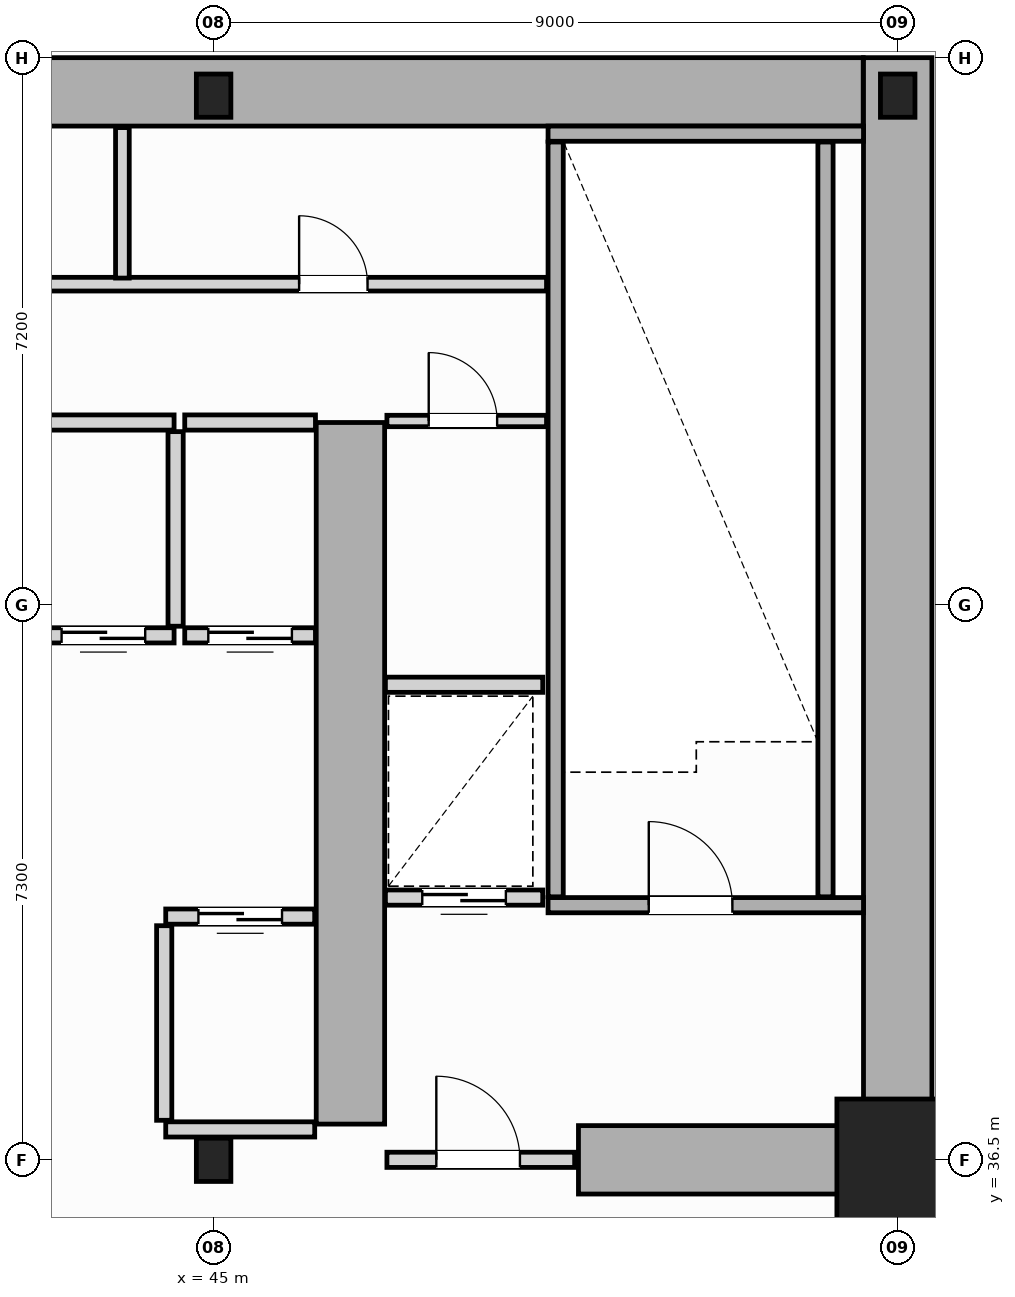
"""IFC4 building model, lengths in metres.
Left out: names, types, materials, properties, quantities, classifications, styles, units other than length and angle.
Written with IfcOpenShell. Run it as: python <this file> out.ifc"""

import sys

from ifc_helpers import new_model, si_unit, direction, frame, frame_2d, origin, origin_2d, place, context, subcontext, project, spatial, rectangle, i_section, extrude, source, transform, mapped, element, fill, save


model = new_model("IFC4")
c1 = context("Model", 3, precision=1e-05, world=origin(), true_north=direction((0.0, 1.0)))
c2 = subcontext(c1, "Body", "Model", "MODEL_VIEW")
j1 = project(units=[si_unit("LENGTHUNIT", "METRE"), si_unit("PLANEANGLEUNIT", "RADIAN")], contexts=[c1])
p1 = place(None, origin())
s1 = spatial("IfcSite", under=j1, at=p1, CompositionType="ELEMENT")
p2 = place(p1, origin())
s2 = spatial("IfcBuilding", under=s1, at=p2, CompositionType="ELEMENT")
p3 = place(p2, origin())
s3 = spatial("IfcBuildingStorey", under=s2, at=p3, CompositionType="ELEMENT", Elevation=0.0)
m1 = source(origin(), c2, "Body", "SweptSolid", [
    extrude(i_section(OverallWidth=0.454, OverallDepth=0.569, WebThickness=0.078, FlangeThickness=0.08, FilletRadius=0.015, at=origin_2d()), origin(), (0.0, 0.0, 1.0), 5.6),
])
p4 = place(p3, frame((45.0, 36.5, 0.0), z_axis=(0.0, 0.0, 1.0), x_axis=(1.0, 0.0, 0.0)))
e1 = element("IfcColumn", 1, at=p4, inside=s3, PredefinedType="COLUMN", context=c2, shape_type="MappedRepresentation", body=[
    mapped(m1, transform((0.0, 0.0, 0.0), scale=1.0)),
])
m2 = source(origin(), c2, "Body", "SweptSolid", [
    extrude(rectangle(XDim=1.6, YDim=1.6, at=origin_2d()), origin(), (0.0, 0.0, 1.0), 5.6),
])
p5 = place(p3, frame((54.0, 36.5, 0.0), z_axis=(0.0, 0.0, 1.0), x_axis=(1.0, 0.0, 0.0)))
e2 = element("IfcColumn", 2, at=p5, inside=s3, PredefinedType="COLUMN", context=c2, shape_type="MappedRepresentation", body=[
    mapped(m2, transform((0.0, 0.0, 0.0), scale=1.0)),
])
for number, where, z_axis, x_axis in (
    (3, (45.0, 50.5, 0.0), (0.0, 0.0, 1.0), (1.0, 0.0, 0.0)),
    (4, (54.0, 50.5, 0.0), (0.0, 0.0, 1.0), (1.0, 0.0, 0.0)),
):
    element("IfcColumn", number, at=place(p3, frame(where, z_axis=z_axis, x_axis=x_axis)), inside=s3, PredefinedType="COLUMN", context=c2, shape_type="MappedRepresentation", body=[
        mapped(m1, transform((0.0, 0.0, 0.0), scale=1.0)),
    ])
p6 = place(p3, frame((34.002, 50.55, 0.0), z_axis=(0.0, 0.0, 1.0), x_axis=(1.0, 0.0, 0.0)))
e5 = element("IfcWall", 5, at=p6, inside=s3, PredefinedType="SHEAR", context=c2, shape_type="SweptSolid", body=[
    extrude(rectangle(XDim=19.544, YDim=0.9, at=frame_2d((9.772, 0.0))), origin(), (0.0, 0.0, 1.0), 5.6),
])
p7 = place(p3, frame((54.0, 36.5, 0.0), z_axis=(0.0, 0.0, 1.0), x_axis=(0.0, 1.0, 0.0)))
e6 = element("IfcWall", 6, at=p7, inside=s3, PredefinedType="SHEAR", context=c2, shape_type="SweptSolid", body=[
    extrude(rectangle(XDim=14.5, YDim=0.9, at=frame_2d((7.25, 0.0))), origin(), (0.0, 0.0, 1.0), 5.6),
])
p8 = place(p3, frame((49.8, 36.5, 0.0), z_axis=(0.0, 0.0, 1.0), x_axis=(1.0, 0.0, 0.0)))
e7 = element("IfcWall", 7, at=p8, inside=s3, PredefinedType="SHEAR", context=c2, shape_type="SweptSolid", body=[
    extrude(rectangle(XDim=3.73, YDim=0.9, at=frame_2d((1.865, 0.0))), origin(), (0.0, 0.0, 1.0), 4.12),
])
p9 = place(p3, frame((46.8, 36.97, 0.0), z_axis=(0.0, 0.0, 1.0), x_axis=(0.0, 1.0, 0.0)))
e8 = element("IfcWall", 8, at=p9, inside=s3, PredefinedType="SHEAR", context=c2, shape_type="SweptSolid", body=[
    extrude(rectangle(XDim=9.23, YDim=0.9, at=frame_2d((4.615, 0.0))), origin(), (0.0, 0.0, 1.0), 5.6),
])
p10 = place(p3, frame((49.4, 39.85, 0.0), z_axis=(0.0, 0.0, 1.0), x_axis=(1.0, 0.0, 0.0)))
e9 = element("IfcWall", 9, at=p10, inside=s3, PredefinedType="SOLIDWALL", context=c2, shape_type="SweptSolid", body=[
    extrude(rectangle(XDim=4.15, YDim=0.2, at=frame_2d((2.075, 0.0))), origin(), (0.0, 0.0, 1.0), 5.6),
])
p11 = place(p10, frame((1.325, 0.0, 0.0)))
e10 = element("IfcOpeningElement", 10, at=p11, cuts=e9, PredefinedType="OPENING", context=c2, shape_type="SweptSolid", body=[
    extrude(rectangle(XDim=1.1, YDim=2.15, at=frame_2d((0.55, 1.075))), frame((0.0, 0.11, 0.0), z_axis=(0.0, -1.0, 0.0), x_axis=(1.0, 0.0, 0.0)), (0.0, 0.0, 1.0), 0.22),
])
p12 = place(p3, frame((49.4, 50.0, 0.0), z_axis=(0.0, 0.0, 1.0), x_axis=(1.0, 0.0, 0.0)))
e11 = element("IfcWall", 11, at=p12, inside=s3, PredefinedType="SOLIDWALL", context=c2, shape_type="SweptSolid", body=[
    extrude(rectangle(XDim=4.15, YDim=0.2, at=frame_2d((2.075, 0.0))), origin(), (0.0, 0.0, 1.0), 5.6),
])
for number, where, z_axis, x_axis in (
    (12, (49.5, 39.96, 0.0), (0.0, 0.0, 1.0), (0.0, 1.0, 0.0)),
    (13, (53.05, 39.96, 0.0), (0.0, 0.0, 1.0), (0.0, 1.0, 0.0)),
):
    element("IfcWall", number, at=place(p3, frame(where, z_axis=z_axis, x_axis=x_axis)), inside=s3, PredefinedType="SOLIDWALL", context=c2, shape_type="SweptSolid", body=[
        extrude(rectangle(XDim=9.93, YDim=0.2, at=frame_2d((4.965, 0.0))), origin(), (0.0, 0.0, 1.0), 5.6),
    ])
p13 = place(p3, frame((47.28, 36.5, 0.0), z_axis=(0.0, 0.0, 1.0), x_axis=(1.0, 0.0, 0.0)))
e14 = element("IfcWall", 14, at=p13, inside=s3, PredefinedType="SOLIDWALL", context=c2, shape_type="SweptSolid", body=[
    extrude(rectangle(XDim=2.47, YDim=0.2, at=frame_2d((1.235, 0.0))), origin(), (0.0, 0.0, 1.0), 4.11),
])
p14 = place(p13, frame((0.65, 0.0, 0.0)))
e15 = element("IfcOpeningElement", 15, at=p14, cuts=e14, PredefinedType="OPENING", context=c2, shape_type="SweptSolid", body=[
    extrude(rectangle(XDim=1.1, YDim=2.15, at=frame_2d((0.55, 1.075))), frame((0.0, 0.11, 0.0), z_axis=(0.0, -1.0, 0.0), x_axis=(1.0, 0.0, 0.0)), (0.0, 0.0, 1.0), 0.22),
])
p15 = place(p3, frame((44.37, 39.7, 0.0), z_axis=(0.0, 0.0, 1.0), x_axis=(1.0, 0.0, 0.0)))
e16 = element("IfcWall", 16, at=p15, inside=s3, PredefinedType="SOLIDWALL", context=c2, shape_type="SweptSolid", body=[
    extrude(rectangle(XDim=1.96, YDim=0.2, at=frame_2d((0.98, 0.0))), origin(), (0.0, 0.0, 1.0), 5.32),
])
p16 = place(p15, frame((0.43, 0.0, 0.0)))
e17 = element("IfcOpeningElement", 17, at=p16, cuts=e16, PredefinedType="OPENING", context=c2, shape_type="SweptSolid", body=[
    extrude(rectangle(XDim=1.1, YDim=2.15, at=frame_2d((0.55, 1.075))), frame((0.0, 0.11, 0.0), z_axis=(0.0, -1.0, 0.0), x_axis=(1.0, 0.0, 0.0)), (0.0, 0.0, 1.0), 0.22),
])
p17 = place(p3, frame((44.37, 36.9, 0.0), z_axis=(0.0, 0.0, 1.0), x_axis=(1.0, 0.0, 0.0)))
e18 = element("IfcWall", 18, at=p17, inside=s3, PredefinedType="SOLIDWALL", context=c2, shape_type="SweptSolid", body=[
    extrude(rectangle(XDim=1.96, YDim=0.2, at=frame_2d((0.98, 0.0))), origin(), (0.0, 0.0, 1.0), 4.11),
])
p18 = place(p3, frame((44.35, 37.02, 0.0), z_axis=(0.0, 0.0, 1.0), x_axis=(0.0, 1.0, 0.0)))
e19 = element("IfcWall", 19, at=p18, inside=s3, PredefinedType="SOLIDWALL", context=c2, shape_type="SweptSolid", body=[
    extrude(rectangle(XDim=2.56, YDim=0.2, at=frame_2d((1.28, 0.0))), origin(), (0.0, 0.0, 1.0), 5.32),
])
p19 = place(p3, frame((42.62, 43.4, 0.0), z_axis=(0.0, 0.0, 1.0), x_axis=(1.0, 0.0, 0.0)))
e20 = element("IfcWall", 20, at=p19, inside=s3, PredefinedType="SOLIDWALL", context=c2, shape_type="SweptSolid", body=[
    extrude(rectangle(XDim=1.86, YDim=0.2, at=frame_2d((0.93, 0.0))), origin(), (0.0, 0.0, 1.0), 5.32),
])
p20 = place(p19, frame((0.38, 0.0, 0.0)))
e21 = element("IfcOpeningElement", 21, at=p20, cuts=e20, PredefinedType="OPENING", context=c2, shape_type="SweptSolid", body=[
    extrude(rectangle(XDim=1.1, YDim=2.15, at=frame_2d((0.55, 1.075))), frame((0.0, 0.11, 0.0), z_axis=(0.0, -1.0, 0.0), x_axis=(1.0, 0.0, 0.0)), (0.0, 0.0, 1.0), 0.22),
])
p21 = place(p3, frame((42.62, 46.2, 0.0), z_axis=(0.0, 0.0, 1.0), x_axis=(1.0, 0.0, 0.0)))
e22 = element("IfcWall", 22, at=p21, inside=s3, PredefinedType="SOLIDWALL", context=c2, shape_type="SweptSolid", body=[
    extrude(rectangle(XDim=1.86, YDim=0.2, at=frame_2d((0.93, 0.0))), origin(), (0.0, 0.0, 1.0), 5.32),
])
p22 = place(p3, frame((44.5, 43.52, 0.0), z_axis=(0.0, 0.0, 1.0), x_axis=(0.0, 1.0, 0.0)))
e23 = element("IfcWall", 23, at=p22, inside=s3, PredefinedType="SOLIDWALL", context=c2, shape_type="SweptSolid", body=[
    extrude(rectangle(XDim=2.56, YDim=0.2, at=frame_2d((1.28, 0.0))), origin(), (0.0, 0.0, 1.0), 5.32),
])
p23 = place(p3, frame((44.62, 43.4, 0.0), z_axis=(0.0, 0.0, 1.0), x_axis=(1.0, 0.0, 0.0)))
e24 = element("IfcWall", 24, at=p23, inside=s3, PredefinedType="SOLIDWALL", context=c2, shape_type="SweptSolid", body=[
    extrude(rectangle(XDim=1.72, YDim=0.2, at=frame_2d((0.86, 0.0))), origin(), (0.0, 0.0, 1.0), 5.32),
])
p24 = place(p23, frame((0.31, 0.0, 0.0)))
e25 = element("IfcOpeningElement", 25, at=p24, cuts=e24, PredefinedType="OPENING", context=c2, shape_type="SweptSolid", body=[
    extrude(rectangle(XDim=1.1, YDim=2.15, at=frame_2d((0.55, 1.075))), frame((0.0, 0.11, 0.0), z_axis=(0.0, -1.0, 0.0), x_axis=(1.0, 0.0, 0.0)), (0.0, 0.0, 1.0), 0.22),
])
p25 = place(p3, frame((44.62, 46.2, 0.0), z_axis=(0.0, 0.0, 1.0), x_axis=(1.0, 0.0, 0.0)))
e26 = element("IfcWall", 26, at=p25, inside=s3, PredefinedType="SOLIDWALL", context=c2, shape_type="SweptSolid", body=[
    extrude(rectangle(XDim=1.72, YDim=0.2, at=frame_2d((0.86, 0.0))), origin(), (0.0, 0.0, 1.0), 5.32),
])
p26 = place(p3, frame((47.26, 39.95, 0.0), z_axis=(0.0, 0.0, 1.0), x_axis=(1.0, 0.0, 0.0)))
e27 = element("IfcWall", 27, at=p26, inside=s3, PredefinedType="SOLIDWALL", context=c2, shape_type="SweptSolid", body=[
    extrude(rectangle(XDim=2.07, YDim=0.2, at=frame_2d((1.035, 0.0))), origin(), (0.0, 0.0, 1.0), 5.32),
])
p27 = place(p26, frame((0.485, 0.0, 0.0)))
e28 = element("IfcOpeningElement", 28, at=p27, cuts=e27, PredefinedType="OPENING", context=c2, shape_type="SweptSolid", body=[
    extrude(rectangle(XDim=1.1, YDim=2.15, at=frame_2d((0.55, 1.075))), frame((0.0, 0.11, 0.0), z_axis=(0.0, -1.0, 0.0), x_axis=(1.0, 0.0, 0.0)), (0.0, 0.0, 1.0), 0.22),
])
p28 = place(p3, frame((47.26, 42.75, 0.0), z_axis=(0.0, 0.0, 1.0), x_axis=(1.0, 0.0, 0.0)))
e29 = element("IfcWall", 29, at=p28, inside=s3, PredefinedType="SOLIDWALL", context=c2, shape_type="SweptSolid", body=[
    extrude(rectangle(XDim=2.07, YDim=0.2, at=frame_2d((1.035, 0.0))), origin(), (0.0, 0.0, 1.0), 5.32),
])
p29 = place(p3, frame((47.28, 46.22, 0.0), z_axis=(0.0, 0.0, 1.0), x_axis=(1.0, 0.0, 0.0)))
e30 = element("IfcWall", 30, at=p29, inside=s3, PredefinedType="PARTITIONING", context=c2, shape_type="SweptSolid", body=[
    extrude(rectangle(XDim=2.1, YDim=0.15, at=frame_2d((1.05, 0.0))), origin(), (0.0, 0.0, 1.0), 5.32),
])
p30 = place(p29, frame((0.55, 0.0, 0.0)))
e31 = element("IfcOpeningElement", 31, at=p30, cuts=e30, PredefinedType="OPENING", context=c2, shape_type="SweptSolid", body=[
    extrude(rectangle(XDim=0.9, YDim=2.1, at=frame_2d((0.45, 1.05))), frame((0.0, 0.085, 0.0), z_axis=(0.0, -1.0, 0.0), x_axis=(1.0, 0.0, 0.0)), (0.0, 0.0, 1.0), 0.17),
])
p31 = place(p3, frame((18.62, 48.02, 0.0), z_axis=(0.0, 0.0, 1.0), x_axis=(1.0, 0.0, 0.0)))
e32 = element("IfcWall", 32, at=p31, inside=s3, PredefinedType="PLUMBINGWALL", context=c2, shape_type="SweptSolid", body=[
    extrude(rectangle(XDim=30.76, YDim=0.18, at=frame_2d((15.38, 0.0))), origin(), (0.0, 0.0, 1.0), 5.32),
])
p32 = place(p31, frame((1.655, 0.0, 0.0)))
e33 = element("IfcOpeningElement", 33, at=p32, cuts=e32, PredefinedType="OPENING", context=c2, shape_type="SweptSolid", body=[
    extrude(rectangle(XDim=0.9, YDim=2.15, at=frame_2d((0.45, 1.075))), frame((0.0, 0.1, 0.0), z_axis=(0.0, -1.0, 0.0), x_axis=(1.0, 0.0, 0.0)), (0.0, 0.0, 1.0), 0.2),
])
p33 = place(p31, frame((6.03, 0.0, 0.0)))
e34 = element("IfcOpeningElement", 34, at=p33, cuts=e32, PredefinedType="OPENING", context=c2, shape_type="SweptSolid", body=[
    extrude(rectangle(XDim=0.9, YDim=2.15, at=frame_2d((0.45, 1.075))), frame((0.0, 0.1, 0.0), z_axis=(0.0, -1.0, 0.0), x_axis=(1.0, 0.0, 0.0)), (0.0, 0.0, 1.0), 0.2),
])
p34 = place(p31, frame((10.93, 0.0, 0.0)))
e35 = element("IfcOpeningElement", 35, at=p34, cuts=e32, PredefinedType="OPENING", context=c2, shape_type="SweptSolid", body=[
    extrude(rectangle(XDim=0.9, YDim=2.15, at=frame_2d((0.45, 1.075))), frame((0.0, 0.1, 0.0), z_axis=(0.0, -1.0, 0.0), x_axis=(1.0, 0.0, 0.0)), (0.0, 0.0, 1.0), 0.2),
])
p35 = place(p31, frame((16.13, 0.0, 0.0)))
e36 = element("IfcOpeningElement", 36, at=p35, cuts=e32, PredefinedType="OPENING", context=c2, shape_type="SweptSolid", body=[
    extrude(rectangle(XDim=0.9, YDim=2.15, at=frame_2d((0.45, 1.075))), frame((0.0, 0.1, 0.0), z_axis=(0.0, -1.0, 0.0), x_axis=(1.0, 0.0, 0.0)), (0.0, 0.0, 1.0), 0.2),
])
p36 = place(p31, frame((21.73, 0.0, 0.0)))
e37 = element("IfcOpeningElement", 37, at=p36, cuts=e32, PredefinedType="OPENING", context=c2, shape_type="SweptSolid", body=[
    extrude(rectangle(XDim=0.9, YDim=2.15, at=frame_2d((0.45, 1.075))), frame((0.0, 0.1, 0.0), z_axis=(0.0, -1.0, 0.0), x_axis=(1.0, 0.0, 0.0)), (0.0, 0.0, 1.0), 0.2),
])
p37 = place(p31, frame((27.505, 0.0, 0.0)))
e38 = element("IfcOpeningElement", 38, at=p37, cuts=e32, PredefinedType="OPENING", context=c2, shape_type="SweptSolid", body=[
    extrude(rectangle(XDim=0.9, YDim=2.15, at=frame_2d((0.45, 1.075))), frame((0.0, 0.1, 0.0), z_axis=(0.0, -1.0, 0.0), x_axis=(1.0, 0.0, 0.0)), (0.0, 0.0, 1.0), 0.2),
])
p38 = place(p3, frame((43.8, 48.1, 0.0), z_axis=(0.0, 0.0, 1.0), x_axis=(0.0, 1.0, 0.0)))
e39 = element("IfcWall", 39, at=p38, inside=s3, PredefinedType="PLUMBINGWALL", context=c2, shape_type="SweptSolid", body=[
    extrude(rectangle(XDim=1.98, YDim=0.18, at=frame_2d((0.99, 0.0))), origin(), (0.0, 0.0, 1.0), 5.32),
])
p39 = place(p3, frame((54.1, 36.55, 0.0), z_axis=(0.0, 0.0, 1.0), x_axis=(1.0, 0.0, 0.0)))
e40 = element("IfcWall", 40, at=p39, inside=s3, PredefinedType="SOLIDWALL", context=c2, shape_type="SweptSolid", body=[
    extrude(rectangle(XDim=8.55, YDim=0.2, at=frame_2d((4.275, 0.0))), origin(), (0.0, 0.0, 1.0), 4.4),
])
p40 = place(p39, frame((2.8, 0.0, 0.0)))
e41 = element("IfcOpeningElement", 41, at=p40, cuts=e40, PredefinedType="OPENING", context=c2, shape_type="SweptSolid", body=[
    extrude(rectangle(XDim=1.1, YDim=2.15, at=frame_2d((0.55, 1.075))), frame((0.0, 0.11, 0.0), z_axis=(0.0, -1.0, 0.0), x_axis=(1.0, 0.0, 0.0)), (0.0, 0.0, 1.0), 0.22),
])
m3 = source(origin(), c2, "Body", "SweptSolid", [
    extrude(rectangle(XDim=1.1, YDim=2.15, at=frame_2d((0.55, 1.075))), frame((0.0, 0.025, 0.0), z_axis=(0.0, -1.0, 0.0), x_axis=(1.0, 0.0, 0.0)), (0.0, 0.0, 1.0), 0.05),
])
p41 = place(p11, origin())
e42 = element("IfcDoor", 42, at=p41, inside=s3, OperationType="SINGLE_SWING_RIGHT", PredefinedType="DOOR", context=c2, shape_type="MappedRepresentation", body=[
    mapped(m3, transform((0.0, 0.0, 0.0), scale=1.0)),
])
fill(e10, e42)
p42 = place(p14, origin())
e43 = element("IfcDoor", 43, at=p42, inside=s3, OperationType="SINGLE_SWING_LEFT", PredefinedType="DOOR", context=c2, shape_type="MappedRepresentation", body=[
    mapped(m3, transform((0.0, 0.0, 0.0), scale=1.0)),
])
fill(e15, e43)
p43 = place(p16, origin())
e44 = element("IfcDoor", 44, at=p43, inside=s3, OperationType="DOUBLE_DOOR_SLIDING", PredefinedType="DOOR", context=c2, shape_type="MappedRepresentation", body=[
    mapped(m3, transform((0.0, 0.0, 0.0), scale=1.0)),
])
fill(e17, e44)
p44 = place(p20, origin())
e45 = element("IfcDoor", 45, at=p44, inside=s3, OperationType="DOUBLE_DOOR_SLIDING", PredefinedType="DOOR", context=c2, shape_type="MappedRepresentation", body=[
    mapped(m3, transform((0.0, 0.0, 0.0), scale=1.0)),
])
fill(e21, e45)
p45 = place(p24, origin())
e46 = element("IfcDoor", 46, at=p45, inside=s3, OperationType="DOUBLE_DOOR_SLIDING", PredefinedType="DOOR", context=c2, shape_type="MappedRepresentation", body=[
    mapped(m3, transform((0.0, 0.0, 0.0), scale=1.0)),
])
fill(e25, e46)
p46 = place(p27, origin())
e47 = element("IfcDoor", 47, at=p46, inside=s3, OperationType="DOUBLE_DOOR_SLIDING", PredefinedType="DOOR", context=c2, shape_type="MappedRepresentation", body=[
    mapped(m3, transform((0.0, 0.0, 0.0), scale=1.0)),
])
fill(e28, e47)
m4 = source(origin(), c2, "Body", "SweptSolid", [
    extrude(rectangle(XDim=0.9, YDim=2.1, at=frame_2d((0.45, 1.05))), frame((0.0, 0.025, 0.0), z_axis=(0.0, -1.0, 0.0), x_axis=(1.0, 0.0, 0.0)), (0.0, 0.0, 1.0), 0.05),
])
p47 = place(p30, origin())
e48 = element("IfcDoor", 48, at=p47, inside=s3, OperationType="SINGLE_SWING_RIGHT", PredefinedType="DOOR", context=c2, shape_type="MappedRepresentation", body=[
    mapped(m4, transform((0.0, 0.0, 0.0), scale=1.0)),
])
fill(e31, e48)
m5 = source(origin(), c2, "Body", "SweptSolid", [
    extrude(rectangle(XDim=0.9, YDim=2.15, at=frame_2d((0.45, 1.075))), frame((0.0, 0.025, 0.0), z_axis=(0.0, -1.0, 0.0), x_axis=(1.0, 0.0, 0.0)), (0.0, 0.0, 1.0), 0.05),
])
p48 = place(p37, origin())
e49 = element("IfcDoor", 49, at=p48, inside=s3, OperationType="SINGLE_SWING_RIGHT", PredefinedType="DOOR", context=c2, shape_type="MappedRepresentation", body=[
    mapped(m5, transform((0.0, 0.0, 0.0), scale=1.0)),
])
fill(e38, e49)
save(model, sys.argv[1])
